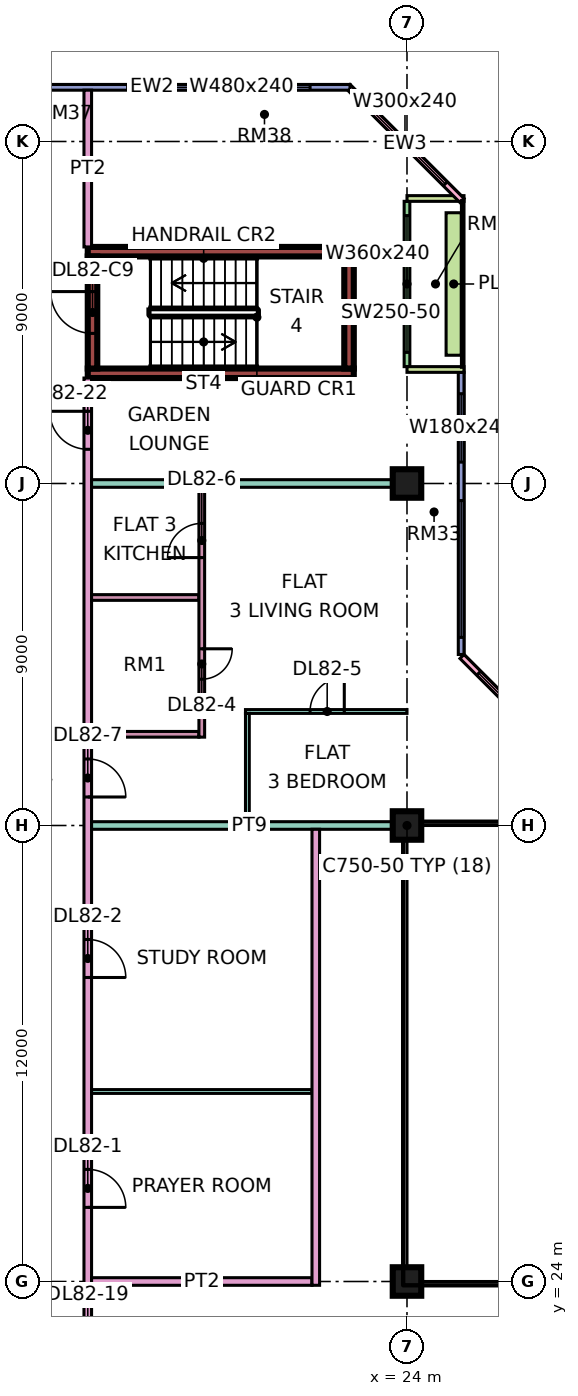
"""IFC4 building model, lengths in metres.
Left out: names, types, materials, properties, quantities, classifications, styles, units other than length and angle.
Written with IfcOpenShell. Run it as: python <this file> out.ifc"""

import sys

from ifc_helpers import new_model, si_unit, direction, frame, frame_2d, origin, origin_2d, place, context, subcontext, project, spatial, rectangle, extrude, element, fill, save


model = new_model("IFC4")
c1 = context("Model", 3, precision=1e-05, world=origin(), true_north=direction((0.0, 1.0)))
c2 = subcontext(c1, "Body", "Model", "MODEL_VIEW")
j1 = project(units=[si_unit("LENGTHUNIT", "METRE"), si_unit("PLANEANGLEUNIT", "RADIAN")], contexts=[c1])
p1 = place(None, origin())
s1 = spatial("IfcSite", under=j1, at=p1, CompositionType="ELEMENT")
p2 = place(p1, origin())
s2 = spatial("IfcBuilding", under=s1, at=p2, CompositionType="ELEMENT")
p3 = place(p2, frame((0.0, 0.0, 353.9)))
s3 = spatial("IfcBuildingStorey", under=s2, at=p3, CompositionType="ELEMENT", Elevation=353.9)
for number, where, z_axis, x_axis in (
    (1, (24.0, 24.0, 0.0), (0.0, 0.0, 1.0), (1.0, 0.0, 0.0)),
    (2, (24.0, 36.0, 0.0), (0.0, 0.0, 1.0), (1.0, 0.0, 0.0)),
    (3, (24.0, 45.0, 0.0), (0.0, 0.0, 1.0), (1.0, 0.0, 0.0)),
):
    element("IfcColumn", number, at=place(p3, frame(where, z_axis=z_axis, x_axis=x_axis)), inside=s3, PredefinedType="COLUMN", context=c2, shape_type="SweptSolid", body=[
        extrude(rectangle(XDim=0.75, YDim=0.75, at=origin_2d()), origin(), (0.0, 0.0, 1.0), 3.75),
    ])
for number, where, z_axis, x_axis in (
    (4, (15.6, 47.9, 0.0), (0.0, 0.0, 1.0), (1.0, 0.0, 0.0)),
    (5, (15.6, 51.1, 0.0), (0.0, 0.0, 1.0), (1.0, 0.0, 0.0)),
):
    element("IfcWall", number, at=place(p3, frame(where, z_axis=z_axis, x_axis=x_axis)), inside=s3, PredefinedType="SHEAR", context=c2, shape_type="SweptSolid", body=[
        extrude(rectangle(XDim=7.0, YDim=0.25, at=frame_2d((3.5, 0.0))), origin(), (0.0, 0.0, 1.0), 3.75),
    ])
p4 = place(p3, frame((15.725, 48.025, 0.0), z_axis=(0.0, 0.0, 1.0), x_axis=(0.0, 1.0, 0.0)))
e6 = element("IfcWall", 6, at=p4, inside=s3, PredefinedType="SHEAR", context=c2, shape_type="SweptSolid", body=[
    extrude(rectangle(XDim=2.95, YDim=0.25, at=frame_2d((1.475, 0.0))), origin(), (0.0, 0.0, 1.0), 3.75),
])
p5 = place(p4, frame((0.925, 0.0, 0.0)))
e7 = element("IfcOpeningElement", 7, at=p5, cuts=e6, PredefinedType="OPENING", context=c2, shape_type="SweptSolid", body=[
    extrude(rectangle(XDim=1.1, YDim=2.2, at=frame_2d((0.55, 1.1))), frame((0.0, 0.135, 0.0), z_axis=(0.0, -1.0, 0.0), x_axis=(1.0, 0.0, 0.0)), (0.0, 0.0, 1.0), 0.27),
])
p6 = place(p3, frame((22.475, 48.025, 0.0), z_axis=(0.0, 0.0, 1.0), x_axis=(0.0, 1.0, 0.0)))
e8 = element("IfcWall", 8, at=p6, inside=s3, PredefinedType="SHEAR", context=c2, shape_type="SweptSolid", body=[
    extrude(rectangle(XDim=2.95, YDim=0.25, at=frame_2d((1.475, 0.0))), origin(), (0.0, 0.0, 1.0), 3.75),
])
p7 = place(p3, frame((28.447, 37.447, 0.0), z_axis=(0.0, 0.0, 1.0), x_axis=(-0.707106781187, 0.707106781187, 0.0)))
e9 = element("IfcWall", 9, at=p7, inside=s3, PredefinedType="SOLIDWALL", context=c2, shape_type="SweptSolid", body=[
    extrude(rectangle(XDim=4.243, YDim=0.15, at=frame_2d((2.121, 0.0))), origin(), (0.0, 0.0, 1.0), 3.35),
])
p8 = place(p7, frame((0.621, 0.0, 0.45)))
e10 = element("IfcOpeningElement", 10, at=p8, cuts=e9, PredefinedType="OPENING", context=c2, shape_type="SweptSolid", body=[
    extrude(rectangle(XDim=3.0, YDim=2.4, at=frame_2d((1.5, 1.2))), frame((0.0, 0.085, 0.0), z_axis=(0.0, -1.0, 0.0), x_axis=(1.0, 0.0, 0.0)), (0.0, 0.0, 1.0), 0.17),
])
p9 = place(p3, frame((25.425, 40.5, 0.0), z_axis=(0.0, 0.0, 1.0), x_axis=(0.0, 1.0, 0.0)))
e11 = element("IfcWall", 11, at=p9, inside=s3, PredefinedType="SOLIDWALL", context=c2, shape_type="SweptSolid", body=[
    extrude(rectangle(XDim=7.425, YDim=0.15, at=frame_2d((3.712, 0.0))), origin(), (0.0, 0.0, 1.0), 3.35),
])
p10 = place(p9, frame((0.45, 0.0, 0.45)))
e12 = element("IfcOpeningElement", 12, at=p10, cuts=e11, PredefinedType="OPENING", context=c2, shape_type="SweptSolid", body=[
    extrude(rectangle(XDim=3.6, YDim=2.4, at=frame_2d((1.8, 1.2))), frame((0.0, 0.085, 0.0), z_axis=(0.0, -1.0, 0.0), x_axis=(1.0, 0.0, 0.0)), (0.0, 0.0, 1.0), 0.17),
])
p11 = place(p9, frame((5.062, 0.0, 0.45)))
e13 = element("IfcOpeningElement", 13, at=p11, cuts=e11, PredefinedType="OPENING", context=c2, shape_type="SweptSolid", body=[
    extrude(rectangle(XDim=1.8, YDim=2.4, at=frame_2d((0.9, 1.2))), frame((0.0, 0.085, 0.0), z_axis=(0.0, -1.0, 0.0), x_axis=(1.0, 0.0, 0.0)), (0.0, 0.0, 1.0), 0.17),
])
p12 = place(p3, frame((24.0, 48.075, 0.0), z_axis=(0.0, 0.0, 1.0), x_axis=(0.0, 1.0, 0.0)))
e14 = element("IfcWall", 14, at=p12, inside=s3, PredefinedType="SOLIDWALL", context=c2, shape_type="SweptSolid", body=[
    extrude(rectangle(XDim=4.35, YDim=0.15, at=frame_2d((2.175, 0.0))), origin(), (0.0, 0.0, 1.0), 3.35),
])
p13 = place(p12, frame((0.375, 0.0, 0.45)))
e15 = element("IfcOpeningElement", 15, at=p13, cuts=e14, PredefinedType="OPENING", context=c2, shape_type="SweptSolid", body=[
    extrude(rectangle(XDim=3.6, YDim=2.4, at=frame_2d((1.8, 1.2))), frame((0.0, 0.085, 0.0), z_axis=(0.0, -1.0, 0.0), x_axis=(1.0, 0.0, 0.0)), (0.0, 0.0, 1.0), 0.17),
])
for number, where, z_axis, x_axis in (
    (16, (25.5, 48.0, 0.0), (0.0, 0.0, 1.0), (-1.0, 0.0, 0.0)),
    (17, (25.5, 52.5, 0.0), (0.0, 0.0, 1.0), (-1.0, 0.0, 0.0)),
):
    element("IfcWall", number, at=place(p3, frame(where, z_axis=z_axis, x_axis=x_axis)), inside=s3, PredefinedType="SOLIDWALL", context=c2, shape_type="SweptSolid", body=[
        extrude(rectangle(XDim=1.5, YDim=0.15, at=frame_2d((0.75, 0.0))), origin(), (0.0, 0.0, 1.0), 3.35),
    ])
p14 = place(p3, frame((25.447, 52.447, 0.0), z_axis=(0.0, 0.0, 1.0), x_axis=(-0.707106781187, 0.707106781187, 0.0)))
e18 = element("IfcWall", 18, at=p14, inside=s3, PredefinedType="SOLIDWALL", context=c2, shape_type="SweptSolid", body=[
    extrude(rectangle(XDim=4.243, YDim=0.15, at=frame_2d((2.121, 0.0))), origin(), (0.0, 0.0, 1.0), 3.35),
])
p15 = place(p14, frame((0.621, 0.0, 0.45)))
e19 = element("IfcOpeningElement", 19, at=p15, cuts=e18, PredefinedType="OPENING", context=c2, shape_type="SweptSolid", body=[
    extrude(rectangle(XDim=3.0, YDim=2.4, at=frame_2d((1.5, 1.2))), frame((0.0, 0.085, 0.0), z_axis=(0.0, -1.0, 0.0), x_axis=(1.0, 0.0, 0.0)), (0.0, 0.0, 1.0), 0.17),
])
p16 = place(p3, frame((22.5, 55.425, 0.0), z_axis=(0.0, 0.0, 1.0), x_axis=(-1.0, 0.0, 0.0)))
e20 = element("IfcWall", 20, at=p16, inside=s3, PredefinedType="SOLIDWALL", context=c2, shape_type="SweptSolid", body=[
    extrude(rectangle(XDim=10.425, YDim=0.15, at=frame_2d((5.212, 0.0))), origin(), (0.0, 0.0, 1.0), 3.35),
])
p17 = place(p16, frame((1.05, 0.0, 0.45)))
e21 = element("IfcOpeningElement", 21, at=p17, cuts=e20, PredefinedType="OPENING", context=c2, shape_type="SweptSolid", body=[
    extrude(rectangle(XDim=4.8, YDim=2.4, at=frame_2d((2.4, 1.2))), frame((0.0, 0.085, 0.0), z_axis=(0.0, -1.0, 0.0), x_axis=(1.0, 0.0, 0.0)), (0.0, 0.0, 1.0), 0.17),
])
p18 = place(p3, frame((25.229, 48.375, 0.0), z_axis=(0.0, 0.0, 1.0), x_axis=(0.0, 1.0, 0.0)))
e22 = element("IfcWall", 22, at=p18, inside=s3, PredefinedType="SOLIDWALL", context=c2, shape_type="SweptSolid", body=[
    extrude(rectangle(XDim=3.75, YDim=0.4, at=frame_2d((1.875, 0.0))), origin(), (0.0, 0.0, 1.0), 0.7),
])
p19 = place(p3, frame((15.6, 20.0, 0.0), z_axis=(0.0, 0.0, 1.0), x_axis=(0.0, 1.0, 0.0)))
e23 = element("IfcWall", 23, at=p19, inside=s3, PredefinedType="PARTITIONING", context=c2, shape_type="SweptSolid", body=[
    extrude(rectangle(XDim=27.775, YDim=0.2, at=frame_2d((13.887, 0.0))), origin(), (0.0, 0.0, 1.0), 3.35),
])
p20 = place(p19, frame((5.95, 0.0, 0.0)))
e24 = element("IfcOpeningElement", 24, at=p20, cuts=e23, PredefinedType="OPENING", context=c2, shape_type="SweptSolid", body=[
    extrude(rectangle(XDim=1.0, YDim=2.1, at=frame_2d((0.5, 1.05))), frame((0.0, 0.11, 0.0), z_axis=(0.0, -1.0, 0.0), x_axis=(1.0, 0.0, 0.0)), (0.0, 0.0, 1.0), 0.22),
])
p21 = place(p19, frame((12.0, 0.0, 0.0)))
e25 = element("IfcOpeningElement", 25, at=p21, cuts=e23, PredefinedType="OPENING", context=c2, shape_type="SweptSolid", body=[
    extrude(rectangle(XDim=1.0, YDim=2.1, at=frame_2d((0.5, 1.05))), frame((0.0, 0.11, 0.0), z_axis=(0.0, -1.0, 0.0), x_axis=(1.0, 0.0, 0.0)), (0.0, 0.0, 1.0), 0.22),
])
p22 = place(p19, frame((16.75, 0.0, 0.0)))
e26 = element("IfcOpeningElement", 26, at=p22, cuts=e23, PredefinedType="OPENING", context=c2, shape_type="SweptSolid", body=[
    extrude(rectangle(XDim=1.0, YDim=2.1, at=frame_2d((0.5, 1.05))), frame((0.0, 0.11, 0.0), z_axis=(0.0, -1.0, 0.0), x_axis=(1.0, 0.0, 0.0)), (0.0, 0.0, 1.0), 0.22),
])
p23 = place(p19, frame((1.15, 0.0, 0.0)))
e27 = element("IfcOpeningElement", 27, at=p23, cuts=e23, PredefinedType="OPENING", context=c2, shape_type="SweptSolid", body=[
    extrude(rectangle(XDim=1.8, YDim=2.1, at=frame_2d((0.9, 1.05))), frame((0.0, 0.11, 0.0), z_axis=(0.0, -1.0, 0.0), x_axis=(1.0, 0.0, 0.0)), (0.0, 0.0, 1.0), 0.22),
])
p24 = place(p19, frame((25.9, 0.0, 0.0)))
e28 = element("IfcOpeningElement", 28, at=p24, cuts=e23, PredefinedType="OPENING", context=c2, shape_type="SweptSolid", body=[
    extrude(rectangle(XDim=1.0, YDim=2.1, at=frame_2d((0.5, 1.05))), frame((0.0, 0.11, 0.0), z_axis=(0.0, -1.0, 0.0), x_axis=(1.0, 0.0, 0.0)), (0.0, 0.0, 1.0), 0.22),
])
p25 = place(p3, frame((15.6, 51.225, 0.0), z_axis=(0.0, 0.0, 1.0), x_axis=(0.0, 1.0, 0.0)))
e29 = element("IfcWall", 29, at=p25, inside=s3, PredefinedType="PARTITIONING", context=c2, shape_type="SweptSolid", body=[
    extrude(rectangle(XDim=4.125, YDim=0.2, at=frame_2d((2.062, 0.0))), origin(), (0.0, 0.0, 1.0), 3.35),
])
p26 = place(p3, frame((15.7, 24.0, 0.0), z_axis=(0.0, 0.0, 1.0), x_axis=(1.0, 0.0, 0.0)))
e30 = element("IfcWall", 30, at=p26, inside=s3, PredefinedType="PARTITIONING", context=c2, shape_type="SweptSolid", body=[
    extrude(rectangle(XDim=5.8, YDim=0.2, at=frame_2d((2.9, 0.0))), origin(), (0.0, 0.0, 1.0), 3.35),
])
p27 = place(p3, frame((15.7, 29.0, 0.0), z_axis=(0.0, 0.0, 1.0), x_axis=(1.0, 0.0, 0.0)))
e31 = element("IfcWall", 31, at=p27, inside=s3, PredefinedType="PARTITIONING", context=c2, shape_type="SweptSolid", body=[
    extrude(rectangle(XDim=5.8, YDim=0.1, at=frame_2d((2.9, 0.0))), origin(), (0.0, 0.0, 1.0), 3.35),
])
p28 = place(p3, frame((15.7, 36.0, 0.0), z_axis=(0.0, 0.0, 1.0), x_axis=(1.0, 0.0, 0.0)))
e32 = element("IfcWall", 32, at=p28, inside=s3, PredefinedType="PARTITIONING", context=c2, shape_type="SweptSolid", body=[
    extrude(rectangle(XDim=8.3, YDim=0.2, at=frame_2d((4.15, 0.0))), origin(), (0.0, 0.0, 1.0), 3.35),
])
for number, where, z_axis, x_axis in (
    (33, (15.7, 38.4, 0.0), (0.0, 0.0, 1.0), (1.0, 0.0, 0.0)),
    (34, (15.7, 42.0, 0.0), (0.0, 0.0, 1.0), (1.0, 0.0, 0.0)),
):
    element("IfcWall", number, at=place(p3, frame(where, z_axis=z_axis, x_axis=x_axis)), inside=s3, PredefinedType="PARTITIONING", context=c2, shape_type="SweptSolid", body=[
        extrude(rectangle(XDim=2.825, YDim=0.15, at=frame_2d((1.413, 0.0))), origin(), (0.0, 0.0, 1.0), 3.35),
    ])
p29 = place(p3, frame((15.7, 45.0, 0.0), z_axis=(0.0, 0.0, 1.0), x_axis=(1.0, 0.0, 0.0)))
e35 = element("IfcWall", 35, at=p29, inside=s3, PredefinedType="PARTITIONING", context=c2, shape_type="SweptSolid", body=[
    extrude(rectangle(XDim=8.3, YDim=0.2, at=frame_2d((4.15, 0.0))), origin(), (0.0, 0.0, 1.0), 3.35),
])
p30 = place(p3, frame((18.6, 38.325, 0.0), z_axis=(0.0, 0.0, 1.0), x_axis=(0.0, 1.0, 0.0)))
e36 = element("IfcWall", 36, at=p30, inside=s3, PredefinedType="PARTITIONING", context=c2, shape_type="SweptSolid", body=[
    extrude(rectangle(XDim=6.575, YDim=0.15, at=frame_2d((3.288, 0.0))), origin(), (0.0, 0.0, 1.0), 3.35),
])
p31 = place(p30, frame((1.525, 0.0, 0.0)))
e37 = element("IfcOpeningElement", 37, at=p31, cuts=e36, PredefinedType="OPENING", context=c2, shape_type="SweptSolid", body=[
    extrude(rectangle(XDim=0.8, YDim=2.1, at=frame_2d((0.4, 1.05))), frame((0.0, 0.085, 0.0), z_axis=(0.0, -1.0, 0.0), x_axis=(1.0, 0.0, 0.0)), (0.0, 0.0, 1.0), 0.17),
])
p32 = place(p30, frame((4.725, 0.0, 0.0)))
e38 = element("IfcOpeningElement", 38, at=p32, cuts=e36, PredefinedType="OPENING", context=c2, shape_type="SweptSolid", body=[
    extrude(rectangle(XDim=0.9, YDim=2.1, at=frame_2d((0.45, 1.05))), frame((0.0, 0.085, 0.0), z_axis=(0.0, -1.0, 0.0), x_axis=(1.0, 0.0, 0.0)), (0.0, 0.0, 1.0), 0.17),
])
p33 = place(p3, frame((19.75, 39.0, 0.0), z_axis=(0.0, 0.0, 1.0), x_axis=(1.0, 0.0, 0.0)))
e39 = element("IfcWall", 39, at=p33, inside=s3, PredefinedType="PARTITIONING", context=c2, shape_type="SweptSolid", body=[
    extrude(rectangle(XDim=4.25, YDim=0.1, at=frame_2d((2.125, 0.0))), origin(), (0.0, 0.0, 1.0), 3.35),
])
p34 = place(p33, frame((1.7, 0.0, 0.0)))
e40 = element("IfcOpeningElement", 40, at=p34, cuts=e39, PredefinedType="OPENING", context=c2, shape_type="SweptSolid", body=[
    extrude(rectangle(XDim=0.9, YDim=2.1, at=frame_2d((0.45, 1.05))), frame((0.0, 0.06, 0.0), z_axis=(0.0, -1.0, 0.0), x_axis=(1.0, 0.0, 0.0)), (0.0, 0.0, 1.0), 0.12),
])
p35 = place(p3, frame((19.8, 36.1, 0.0), z_axis=(0.0, 0.0, 1.0), x_axis=(0.0, 1.0, 0.0)))
e41 = element("IfcWall", 41, at=p35, inside=s3, PredefinedType="PARTITIONING", context=c2, shape_type="SweptSolid", body=[
    extrude(rectangle(XDim=2.85, YDim=0.1, at=frame_2d((1.425, 0.0))), origin(), (0.0, 0.0, 1.0), 3.35),
])
p36 = place(p3, frame((21.6, 23.9, 0.0), z_axis=(0.0, 0.0, 1.0), x_axis=(0.0, 1.0, 0.0)))
e42 = element("IfcWall", 42, at=p36, inside=s3, PredefinedType="PARTITIONING", context=c2, shape_type="SweptSolid", body=[
    extrude(rectangle(XDim=12.0, YDim=0.2, at=frame_2d((6.0, 0.0))), origin(), (0.0, 0.0, 1.0), 3.35),
])
p37 = place(p8, origin())
e43 = element("IfcWindow", 43, at=p37, inside=s3, PartitioningType="SINGLE_PANEL", PredefinedType="WINDOW", context=c2, shape_type="SweptSolid", body=[
    extrude(rectangle(XDim=3.0, YDim=2.4, at=frame_2d((1.5, 1.2))), frame((0.0, 0.03, 0.0), z_axis=(0.0, -1.0, 0.0), x_axis=(1.0, 0.0, 0.0)), (0.0, 0.0, 1.0), 0.06),
])
fill(e10, e43)
p38 = place(p10, origin())
e44 = element("IfcWindow", 44, at=p38, inside=s3, PartitioningType="SINGLE_PANEL", PredefinedType="WINDOW", context=c2, shape_type="SweptSolid", body=[
    extrude(rectangle(XDim=3.6, YDim=2.4, at=frame_2d((1.8, 1.2))), frame((0.0, 0.03, 0.0), z_axis=(0.0, -1.0, 0.0), x_axis=(1.0, 0.0, 0.0)), (0.0, 0.0, 1.0), 0.06),
])
fill(e12, e44)
p39 = place(p11, origin())
e45 = element("IfcWindow", 45, at=p39, inside=s3, PartitioningType="SINGLE_PANEL", PredefinedType="WINDOW", context=c2, shape_type="SweptSolid", body=[
    extrude(rectangle(XDim=1.8, YDim=2.4, at=frame_2d((0.9, 1.2))), frame((0.0, 0.03, 0.0), z_axis=(0.0, -1.0, 0.0), x_axis=(1.0, 0.0, 0.0)), (0.0, 0.0, 1.0), 0.06),
])
fill(e13, e45)
p40 = place(p13, origin())
e46 = element("IfcWindow", 46, at=p40, inside=s3, PartitioningType="SINGLE_PANEL", PredefinedType="WINDOW", context=c2, shape_type="SweptSolid", body=[
    extrude(rectangle(XDim=3.6, YDim=2.4, at=frame_2d((1.8, 1.2))), frame((0.0, 0.03, 0.0), z_axis=(0.0, -1.0, 0.0), x_axis=(1.0, 0.0, 0.0)), (0.0, 0.0, 1.0), 0.06),
])
fill(e15, e46)
p41 = place(p15, origin())
e47 = element("IfcWindow", 47, at=p41, inside=s3, PartitioningType="SINGLE_PANEL", PredefinedType="WINDOW", context=c2, shape_type="SweptSolid", body=[
    extrude(rectangle(XDim=3.0, YDim=2.4, at=frame_2d((1.5, 1.2))), frame((0.0, 0.03, 0.0), z_axis=(0.0, -1.0, 0.0), x_axis=(1.0, 0.0, 0.0)), (0.0, 0.0, 1.0), 0.06),
])
fill(e19, e47)
p42 = place(p17, origin())
e48 = element("IfcWindow", 48, at=p42, inside=s3, PartitioningType="SINGLE_PANEL", PredefinedType="WINDOW", context=c2, shape_type="SweptSolid", body=[
    extrude(rectangle(XDim=4.8, YDim=2.4, at=frame_2d((2.4, 1.2))), frame((0.0, 0.03, 0.0), z_axis=(0.0, -1.0, 0.0), x_axis=(1.0, 0.0, 0.0)), (0.0, 0.0, 1.0), 0.06),
])
fill(e21, e48)
p43 = place(p5, frame((1.1, 0.0, 0.0), z_axis=(0.0, 0.0, 1.0), x_axis=(-1.0, 0.0, 0.0)))
e49 = element("IfcDoor", 49, at=p43, inside=s3, OperationType="SINGLE_SWING_RIGHT", PredefinedType="DOOR", context=c2, shape_type="SweptSolid", body=[
    extrude(rectangle(XDim=1.1, YDim=2.2, at=frame_2d((0.55, 1.1))), frame((0.0, 0.025, 0.0), z_axis=(0.0, -1.0, 0.0), x_axis=(1.0, 0.0, 0.0)), (0.0, 0.0, 1.0), 0.05),
])
fill(e7, e49)
p44 = place(p20, frame((1.0, 0.0, 0.0), z_axis=(0.0, 0.0, 1.0), x_axis=(-1.0, 0.0, 0.0)))
e50 = element("IfcDoor", 50, at=p44, inside=s3, OperationType="SINGLE_SWING_LEFT", PredefinedType="DOOR", context=c2, shape_type="SweptSolid", body=[
    extrude(rectangle(XDim=1.0, YDim=2.1, at=frame_2d((0.5, 1.05))), frame((0.0, 0.025, 0.0), z_axis=(0.0, -1.0, 0.0), x_axis=(1.0, 0.0, 0.0)), (0.0, 0.0, 1.0), 0.05),
])
fill(e24, e50)
p45 = place(p21, frame((1.0, 0.0, 0.0), z_axis=(0.0, 0.0, 1.0), x_axis=(-1.0, 0.0, 0.0)))
e51 = element("IfcDoor", 51, at=p45, inside=s3, OperationType="SINGLE_SWING_LEFT", PredefinedType="DOOR", context=c2, shape_type="SweptSolid", body=[
    extrude(rectangle(XDim=1.0, YDim=2.1, at=frame_2d((0.5, 1.05))), frame((0.0, 0.025, 0.0), z_axis=(0.0, -1.0, 0.0), x_axis=(1.0, 0.0, 0.0)), (0.0, 0.0, 1.0), 0.05),
])
fill(e25, e51)
p46 = place(p31, origin())
e52 = element("IfcDoor", 52, at=p46, inside=s3, OperationType="SINGLE_SWING_RIGHT", PredefinedType="DOOR", context=c2, shape_type="SweptSolid", body=[
    extrude(rectangle(XDim=0.8, YDim=2.1, at=frame_2d((0.4, 1.05))), frame((0.0, 0.025, 0.0), z_axis=(0.0, -1.0, 0.0), x_axis=(1.0, 0.0, 0.0)), (0.0, 0.0, 1.0), 0.05),
])
fill(e37, e52)
p47 = place(p34, frame((0.9, 0.0, 0.0), z_axis=(0.0, 0.0, 1.0), x_axis=(-1.0, 0.0, 0.0)))
e53 = element("IfcDoor", 53, at=p47, inside=s3, OperationType="SINGLE_SWING_RIGHT", PredefinedType="DOOR", context=c2, shape_type="SweptSolid", body=[
    extrude(rectangle(XDim=0.9, YDim=2.1, at=frame_2d((0.45, 1.05))), frame((0.0, 0.025, 0.0), z_axis=(0.0, -1.0, 0.0), x_axis=(1.0, 0.0, 0.0)), (0.0, 0.0, 1.0), 0.05),
])
fill(e40, e53)
p48 = place(p32, origin())
e54 = element("IfcDoor", 54, at=p48, inside=s3, OperationType="SINGLE_SWING_LEFT", PredefinedType="DOOR", context=c2, shape_type="SweptSolid", body=[
    extrude(rectangle(XDim=0.9, YDim=2.1, at=frame_2d((0.45, 1.05))), frame((0.0, 0.025, 0.0), z_axis=(0.0, -1.0, 0.0), x_axis=(1.0, 0.0, 0.0)), (0.0, 0.0, 1.0), 0.05),
])
fill(e38, e54)
p49 = place(p22, frame((1.0, 0.0, 0.0), z_axis=(0.0, 0.0, 1.0), x_axis=(-1.0, 0.0, 0.0)))
e55 = element("IfcDoor", 55, at=p49, inside=s3, OperationType="SINGLE_SWING_LEFT", PredefinedType="DOOR", context=c2, shape_type="SweptSolid", body=[
    extrude(rectangle(XDim=1.0, YDim=2.1, at=frame_2d((0.5, 1.05))), frame((0.0, 0.025, 0.0), z_axis=(0.0, -1.0, 0.0), x_axis=(1.0, 0.0, 0.0)), (0.0, 0.0, 1.0), 0.05),
])
fill(e26, e55)
p50 = place(p24, frame((1.0, 0.0, 0.0), z_axis=(0.0, 0.0, 1.0), x_axis=(-1.0, 0.0, 0.0)))
e56 = element("IfcDoor", 56, at=p50, inside=s3, OperationType="SINGLE_SWING_RIGHT", PredefinedType="DOOR", context=c2, shape_type="SweptSolid", body=[
    extrude(rectangle(XDim=1.0, YDim=2.1, at=frame_2d((0.5, 1.05))), frame((0.0, 0.025, 0.0), z_axis=(0.0, -1.0, 0.0), x_axis=(1.0, 0.0, 0.0)), (0.0, 0.0, 1.0), 0.05),
])
fill(e28, e56)
save(model, sys.argv[1])
